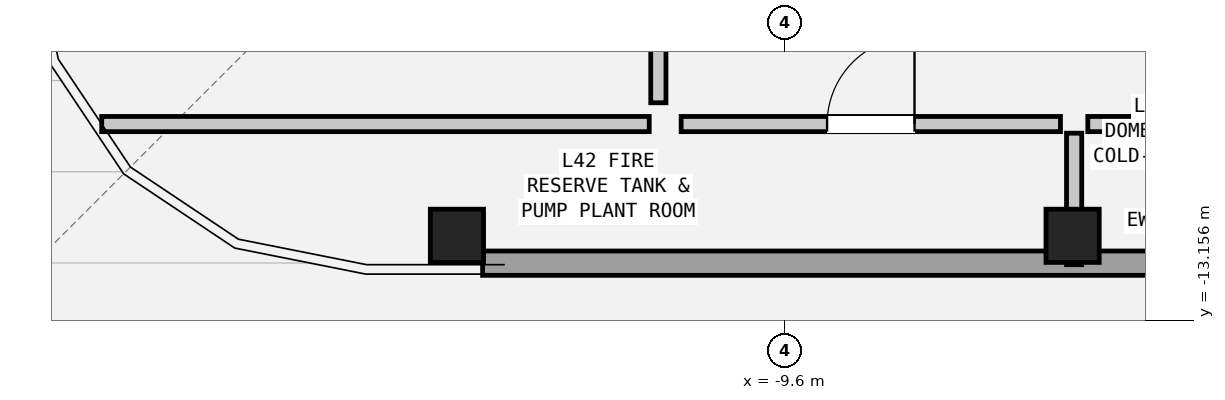
"""IFC4 building model, lengths in metres.
Left out: names, types, materials, properties, quantities, classifications, styles, units other than length and angle.
Written with IfcOpenShell. Run it as: python <this file> out.ifc"""

import sys

from ifc_helpers import new_model, si_unit, direction, frame, frame_2d, origin, origin_2d, place, context, subcontext, project, spatial, rectangle, hollow_rectangle, extrude, element, fill, save


model = new_model("IFC4")
c1 = context("Model", 3, precision=1e-05, world=origin(), true_north=direction((0.0, 1.0)))
c2 = subcontext(c1, "Body", "Model", "MODEL_VIEW")
j1 = project(units=[si_unit("LENGTHUNIT", "METRE"), si_unit("PLANEANGLEUNIT", "RADIAN")], contexts=[c1])
p1 = place(None, origin())
s1 = spatial("IfcSite", under=j1, at=p1, CompositionType="ELEMENT")
p2 = place(p1, origin())
s2 = spatial("IfcBuilding", under=s1, at=p2, CompositionType="ELEMENT")
p3 = place(p2, frame((0.0, 0.0, 144.6)))
s3 = spatial("IfcBuildingStorey", under=s2, at=p3, CompositionType="ELEMENT", Elevation=144.6)
for number, where, z_axis, x_axis in (
    (1, (-13.92, -12.04, 0.0), (0.0, 0.0, 1.0), (1.0, 0.0, 0.0)),
    (2, (-5.82, -12.04, 0.0), (0.0, 0.0, 1.0), (1.0, 0.0, 0.0)),
):
    element("IfcColumn", number, at=place(p3, frame(where, z_axis=z_axis, x_axis=x_axis)), inside=s3, PredefinedType="COLUMN", context=c2, shape_type="SweptSolid", body=[
        extrude(hollow_rectangle(XDim=0.7, YDim=0.7, WallThickness=0.045, at=origin_2d()), origin(), (0.0, 0.0, 1.0), 3.6),
    ])
p4 = place(p3, frame((10.042, -12.4, 0.0), z_axis=(0.0, 0.0, 1.0), x_axis=(-1.0, 0.0, 0.0)))
e3 = element("IfcWall", 3, at=p4, inside=s3, PredefinedType="SOLIDWALL", context=c2, shape_type="SweptSolid", body=[
    extrude(rectangle(XDim=23.624, YDim=0.32, at=frame_2d((11.812, 0.0))), origin(), (0.0, 0.0, 1.0), 2.242),
])
p5 = place(p4, frame((4.563, 0.0, 0.0)))
e4 = element("IfcOpeningElement", 4, at=p5, cuts=e3, PredefinedType="OPENING", context=c2, shape_type="SweptSolid", body=[
    extrude(rectangle(XDim=1.25, YDim=2.02, at=frame_2d((0.625, 1.01))), frame((0.0, 0.172, 0.0), z_axis=(0.0, -1.0, 0.0), x_axis=(1.0, 0.0, 0.0)), (0.0, 0.0, 1.0), 0.344),
])
p6 = place(p3, frame((-10.97, -10.57, 0.0), z_axis=(0.0, 0.0, 1.0), x_axis=(1.0, 0.0, 0.0)))
e5 = element("IfcWall", 5, at=p6, inside=s3, PredefinedType="PARTITIONING", context=c2, shape_type="SweptSolid", body=[
    extrude(rectangle(XDim=4.99, YDim=0.2, at=frame_2d((2.495, 0.0))), origin(), (0.0, 0.0, 1.0), 3.38),
])
p7 = place(p6, frame((1.92, 0.0, 0.0)))
e6 = element("IfcOpeningElement", 6, at=p7, cuts=e5, PredefinedType="OPENING", context=c2, shape_type="SweptSolid", body=[
    extrude(rectangle(XDim=1.15, YDim=2.1, at=frame_2d((0.575, 1.05))), frame((0.0, 0.112, 0.0), z_axis=(0.0, -1.0, 0.0), x_axis=(1.0, 0.0, 0.0)), (0.0, 0.0, 1.0), 0.224),
])
p8 = place(p3, frame((-5.8, -12.42, 0.0), z_axis=(0.0, 0.0, 1.0), x_axis=(0.0, 1.0, 0.0)))
e7 = element("IfcWall", 7, at=p8, inside=s3, PredefinedType="PARTITIONING", context=c2, shape_type="SweptSolid", body=[
    extrude(rectangle(XDim=1.73, YDim=0.2, at=frame_2d((0.865, 0.0))), origin(), (0.0, 0.0, 1.0), 2.901),
])
p9 = place(p3, frame((-5.62, -10.57, 0.0), z_axis=(0.0, 0.0, 1.0), x_axis=(1.0, 0.0, 0.0)))
e8 = element("IfcWall", 8, at=p9, inside=s3, PredefinedType="PARTITIONING", context=c2, shape_type="SweptSolid", body=[
    extrude(rectangle(XDim=5.09, YDim=0.2, at=frame_2d((2.545, 0.0))), origin(), (0.0, 0.0, 1.0), 3.38),
])
p10 = place(p9, frame((1.99, 0.0, 0.0)))
e9 = element("IfcOpeningElement", 9, at=p10, cuts=e8, PredefinedType="OPENING", context=c2, shape_type="SweptSolid", body=[
    extrude(rectangle(XDim=1.15, YDim=2.1, at=frame_2d((0.575, 1.05))), frame((0.0, 0.112, 0.0), z_axis=(0.0, -1.0, 0.0), x_axis=(1.0, 0.0, 0.0)), (0.0, 0.0, 1.0), 0.224),
])
p11 = place(p3, frame((-18.593, -10.57, 0.0), z_axis=(0.0, 0.0, 1.0), x_axis=(1.0, 0.0, 0.0)))
e10 = element("IfcWall", 10, at=p11, inside=s3, PredefinedType="PARTITIONING", context=c2, shape_type="SweptSolid", body=[
    extrude(rectangle(XDim=7.203, YDim=0.2, at=frame_2d((3.602, 0.0))), origin(), (0.0, 0.0, 1.0), 3.38),
])
p12 = place(p3, frame((-11.27, 0.39, 0.0), z_axis=(0.0, 0.0, 1.0), x_axis=(0.0, -1.0, 0.0)))
e11 = element("IfcWall", 11, at=p12, inside=s3, PredefinedType="PARTITIONING", context=c2, shape_type="SweptSolid", body=[
    extrude(rectangle(XDim=10.68, YDim=0.2, at=frame_2d((5.34, 0.0))), origin(), (0.0, 0.0, 1.0), 3.38),
])
p13 = place(p12, frame((1.561, 0.0, 0.0)))
e12 = element("IfcOpeningElement", 12, at=p13, cuts=e11, PredefinedType="OPENING", context=c2, shape_type="SweptSolid", body=[
    extrude(rectangle(XDim=1.15, YDim=2.1, at=frame_2d((0.575, 1.05))), frame((0.0, 0.112, 0.0), z_axis=(0.0, -1.0, 0.0), x_axis=(1.0, 0.0, 0.0)), (0.0, 0.0, 1.0), 0.224),
])
p14 = place(p7, origin())
e13 = element("IfcDoor", 13, at=p14, inside=s3, OperationType="SINGLE_SWING_RIGHT", PredefinedType="DOOR", context=c2, shape_type="SweptSolid", body=[
    extrude(rectangle(XDim=1.15, YDim=2.1, at=frame_2d((0.575, 1.05))), frame((0.0, 0.025, 0.0), z_axis=(0.0, -1.0, 0.0), x_axis=(1.0, 0.0, 0.0)), (0.0, 0.0, 1.0), 0.05),
])
fill(e6, e13)
save(model, sys.argv[1])
